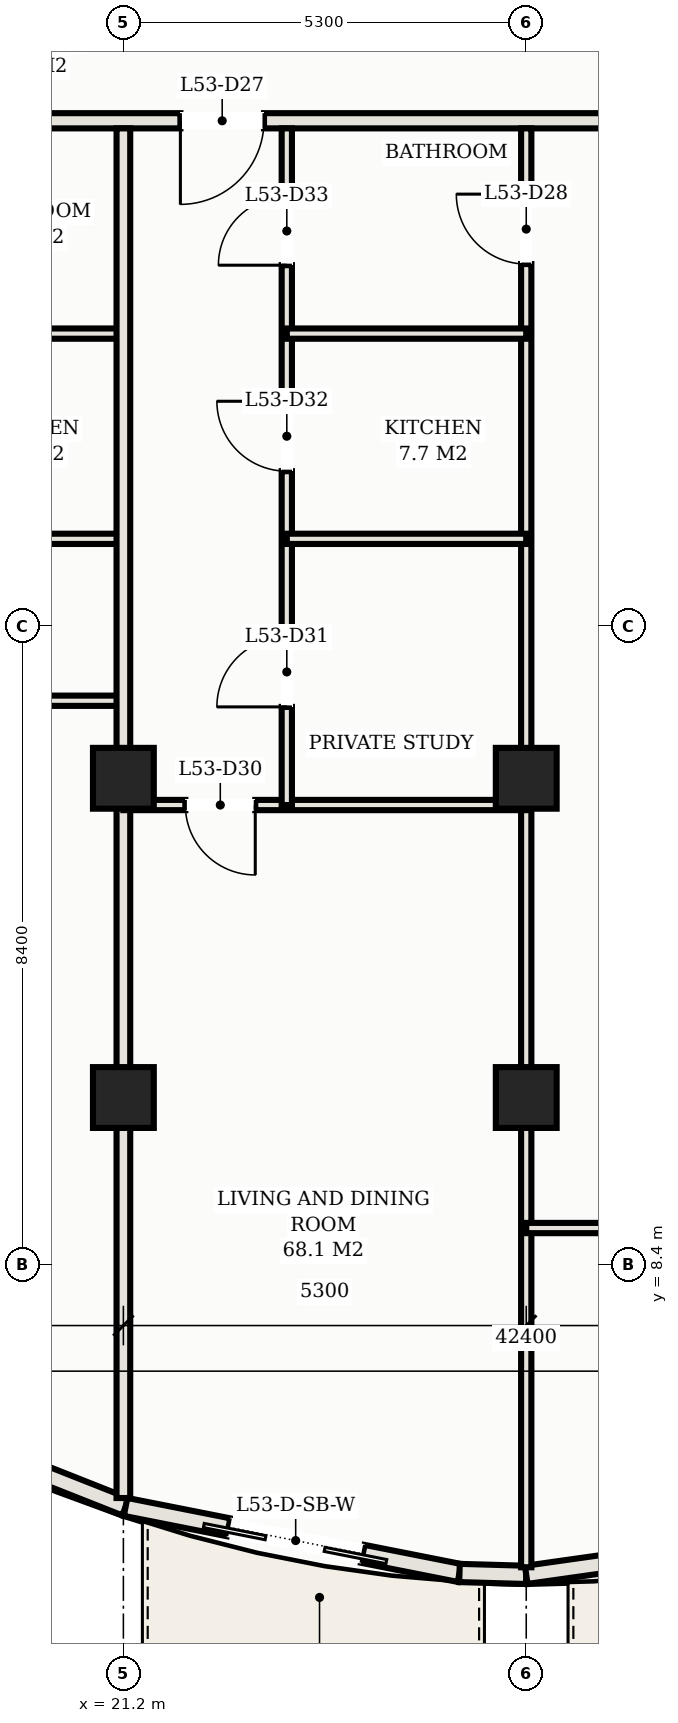
"""IFC4 building model, lengths in metres.
Left out: names, types, materials, properties, quantities, classifications, styles, units other than length and angle.
Written with IfcOpenShell. Run it as: python <this file> out.ifc"""

import sys

from ifc_helpers import new_model, si_unit, direction, frame, frame_2d, origin, origin_2d, place, context, subcontext, project, spatial, rectangle, hollow_rectangle, extrude, element, fill, save


model = new_model("IFC4")
c1 = context("Model", 3, precision=1e-05, world=origin(), true_north=direction((0.0, 1.0)))
c2 = subcontext(c1, "Body", "Model", "MODEL_VIEW")
j1 = project(units=[si_unit("LENGTHUNIT", "METRE"), si_unit("PLANEANGLEUNIT", "RADIAN")], contexts=[c1])
p1 = place(None, origin())
s1 = spatial("IfcSite", under=j1, at=p1, CompositionType="ELEMENT")
p2 = place(p1, origin())
s2 = spatial("IfcBuilding", under=s1, at=p2, CompositionType="ELEMENT")
p3 = place(p2, frame((0.0, 0.0, 196.7)))
s3 = spatial("IfcBuildingStorey", under=s2, at=p3, CompositionType="ELEMENT", Elevation=196.7)
for number, where, z_axis, x_axis in (
    (1, (21.2, 14.8, 0.0), (0.0, 0.0, 1.0), (1.0, 0.0, 0.0)),
    (2, (21.2, 10.6, 0.0), (0.0, 0.0, 1.0), (1.0, 0.0, 0.0)),
    (3, (26.5, 14.8, 0.0), (0.0, 0.0, 1.0), (1.0, 0.0, 0.0)),
    (4, (26.5, 10.6, 0.0), (0.0, 0.0, 1.0), (1.0, 0.0, 0.0)),
):
    element("IfcColumn", number, at=place(p3, frame(where, z_axis=z_axis, x_axis=x_axis)), inside=s3, PredefinedType="COLUMN", context=c2, shape_type="SweptSolid", body=[
        extrude(hollow_rectangle(XDim=0.8, YDim=0.8, WallThickness=0.028, at=origin_2d()), origin(), (0.0, 0.0, 1.0), 3.3),
    ])
p4 = place(p3, frame((19.444, 5.92, 0.0), z_axis=(0.0, 0.0, 1.0), x_axis=(0.92993442177, -0.367725401906, 0.0)))
e5 = element("IfcWall", 5, at=p4, inside=s3, PredefinedType="SOLIDWALL", context=c2, shape_type="SweptSolid", body=[
    extrude(rectangle(XDim=1.919, YDim=0.24, at=frame_2d((0.96, 0.0))), origin(), (0.0, 0.0, 1.0), 3.11),
])
p5 = place(p3, frame((21.229, 5.214, 0.0), z_axis=(0.0, 0.0, 1.0), x_axis=(0.980985349685, -0.194081796425, 0.0)))
e6 = element("IfcWall", 6, at=p5, inside=s3, PredefinedType="SOLIDWALL", context=c2, shape_type="SweptSolid", body=[
    extrude(rectangle(XDim=4.478, YDim=0.24, at=frame_2d((2.239, 0.0))), origin(), (0.0, 0.0, 1.0), 3.11),
])
p6 = place(p5, frame((1.381, 0.0, 0.0)))
e7 = element("IfcOpeningElement", 7, at=p6, cuts=e6, PredefinedType="OPENING", context=c2, shape_type="SweptSolid", body=[
    extrude(rectangle(XDim=1.8, YDim=2.2, at=frame_2d((0.9, 1.1))), frame((0.0, 0.13, 0.0), z_axis=(0.0, -1.0, 0.0), x_axis=(1.0, 0.0, 0.0)), (0.0, 0.0, 1.0), 0.26),
])
p7 = place(p3, frame((25.622, 4.345, 0.0), z_axis=(0.0, 0.0, 1.0), x_axis=(0.999597960231, -0.028353446035, 0.0)))
e8 = element("IfcWall", 8, at=p7, inside=s3, PredefinedType="SOLIDWALL", context=c2, shape_type="SweptSolid", body=[
    extrude(rectangle(XDim=0.878, YDim=0.24, at=frame_2d((0.439, 0.0))), origin(), (0.0, 0.0, 1.0), 3.11),
])
p8 = place(p3, frame((26.5, 4.32, 0.0), z_axis=(0.0, 0.0, 1.0), x_axis=(0.990156470874, 0.139964864115, 0.0)))
e9 = element("IfcWall", 9, at=p8, inside=s3, PredefinedType="SOLIDWALL", context=c2, shape_type="SweptSolid", body=[
    extrude(rectangle(XDim=4.436, YDim=0.24, at=frame_2d((2.218, 0.0))), origin(), (0.0, 0.0, 1.0), 3.11),
])
p9 = place(p8, frame((1.318, 0.0, 0.0)))
e10 = element("IfcOpeningElement", 10, at=p9, cuts=e9, PredefinedType="OPENING", context=c2, shape_type="SweptSolid", body=[
    extrude(rectangle(XDim=1.8, YDim=2.2, at=frame_2d((0.9, 1.1))), frame((0.0, 0.13, 0.0), z_axis=(0.0, -1.0, 0.0), x_axis=(1.0, 0.0, 0.0)), (0.0, 0.0, 1.0), 0.26),
])
p10 = place(p3, frame((6.72, 23.45, 0.0), z_axis=(0.0, 0.0, 1.0), x_axis=(1.0, 0.0, 0.0)))
e11 = element("IfcWall", 11, at=p10, inside=s3, PredefinedType="PARTITIONING", context=c2, shape_type="SweptSolid", body=[
    extrude(rectangle(XDim=39.56, YDim=0.2, at=frame_2d((19.78, 0.0))), origin(), (0.0, 0.0, 1.0), 2.43),
])
p11 = place(p10, frame((4.63, 0.0, 0.0)))
e12 = element("IfcOpeningElement", 12, at=p11, cuts=e11, PredefinedType="OPENING", context=c2, shape_type="SweptSolid", body=[
    extrude(rectangle(XDim=1.1, YDim=2.25, at=frame_2d((0.55, 1.125))), frame((0.0, 0.11, 0.0), z_axis=(0.0, -1.0, 0.0), x_axis=(1.0, 0.0, 0.0)), (0.0, 0.0, 1.0), 0.22),
])
p12 = place(p10, frame((9.93, 0.0, 0.0)))
e13 = element("IfcOpeningElement", 13, at=p12, cuts=e11, PredefinedType="OPENING", context=c2, shape_type="SweptSolid", body=[
    extrude(rectangle(XDim=1.1, YDim=2.25, at=frame_2d((0.55, 1.125))), frame((0.0, 0.11, 0.0), z_axis=(0.0, -1.0, 0.0), x_axis=(1.0, 0.0, 0.0)), (0.0, 0.0, 1.0), 0.22),
])
p13 = place(p10, frame((15.23, 0.0, 0.0)))
e14 = element("IfcOpeningElement", 14, at=p13, cuts=e11, PredefinedType="OPENING", context=c2, shape_type="SweptSolid", body=[
    extrude(rectangle(XDim=1.1, YDim=2.25, at=frame_2d((0.55, 1.125))), frame((0.0, 0.11, 0.0), z_axis=(0.0, -1.0, 0.0), x_axis=(1.0, 0.0, 0.0)), (0.0, 0.0, 1.0), 0.22),
])
p14 = place(p10, frame((1.635, 0.0, 0.0)))
e15 = element("IfcOpeningElement", 15, at=p14, cuts=e11, PredefinedType="OPENING", context=c2, shape_type="SweptSolid", body=[
    extrude(rectangle(XDim=0.92, YDim=2.15, at=frame_2d((0.46, 1.075))), frame((0.0, 0.11, 0.0), z_axis=(0.0, -1.0, 0.0), x_axis=(1.0, 0.0, 0.0)), (0.0, 0.0, 1.0), 0.22),
])
p15 = place(p10, frame((37.005, 0.0, 0.0)))
e16 = element("IfcOpeningElement", 16, at=p15, cuts=e11, PredefinedType="OPENING", context=c2, shape_type="SweptSolid", body=[
    extrude(rectangle(XDim=0.92, YDim=2.15, at=frame_2d((0.46, 1.075))), frame((0.0, 0.11, 0.0), z_axis=(0.0, -1.0, 0.0), x_axis=(1.0, 0.0, 0.0)), (0.0, 0.0, 1.0), 0.22),
])
p16 = place(p3, frame((15.9, 15.82, 0.0), z_axis=(0.0, 0.0, 1.0), x_axis=(1.0, 0.0, 0.0)))
e17 = element("IfcWall", 17, at=p16, inside=s3, PredefinedType="PARTITIONING", context=c2, shape_type="SweptSolid", body=[
    extrude(rectangle(XDim=5.3, YDim=0.135, at=frame_2d((2.65, 0.0))), origin(), (0.0, 0.0, 1.0), 2.43),
])
p17 = place(p16, frame((0.815, 0.0, 0.0)))
e18 = element("IfcOpeningElement", 18, at=p17, cuts=e17, PredefinedType="OPENING", context=c2, shape_type="SweptSolid", body=[
    extrude(rectangle(XDim=0.92, YDim=2.15, at=frame_2d((0.46, 1.075))), frame((0.0, 0.078, 0.0), z_axis=(0.0, -1.0, 0.0), x_axis=(1.0, 0.0, 0.0)), (0.0, 0.0, 1.0), 0.155),
])
for number, where, z_axis, x_axis in (
    (19, (18.05, 17.95, 0.0), (0.0, 0.0, 1.0), (1.0, 0.0, 0.0)),
    (20, (18.05, 20.65, 0.0), (0.0, 0.0, 1.0), (1.0, 0.0, 0.0)),
):
    element("IfcWall", number, at=place(p3, frame(where, z_axis=z_axis, x_axis=x_axis)), inside=s3, PredefinedType="PARTITIONING", context=c2, shape_type="SweptSolid", body=[
        extrude(rectangle(XDim=3.15, YDim=0.135, at=frame_2d((1.575, 0.0))), origin(), (0.0, 0.0, 1.0), 2.43),
    ])
p18 = place(p3, frame((21.2, 5.331, 0.0), z_axis=(0.0, 0.0, 1.0), x_axis=(0.0, 1.0, 0.0)))
e21 = element("IfcWall", 21, at=p18, inside=s3, PredefinedType="PARTITIONING", context=c2, shape_type="SweptSolid", body=[
    extrude(rectangle(XDim=18.019, YDim=0.18, at=frame_2d((9.01, 0.0))), origin(), (0.0, 0.0, 1.0), 2.43),
])
p19 = place(p3, frame((26.5, 4.42, 0.0), z_axis=(0.0, 0.0, 1.0), x_axis=(0.0, 1.0, 0.0)))
e22 = element("IfcWall", 22, at=p19, inside=s3, PredefinedType="PARTITIONING", context=c2, shape_type="SweptSolid", body=[
    extrude(rectangle(XDim=18.93, YDim=0.135, at=frame_2d((9.465, 0.0))), origin(), (0.0, 0.0, 1.0), 2.43),
])
p20 = place(p19, frame((17.145, 0.0, 0.0)))
e23 = element("IfcOpeningElement", 23, at=p20, cuts=e22, PredefinedType="OPENING", context=c2, shape_type="SweptSolid", body=[
    extrude(rectangle(XDim=0.92, YDim=2.15, at=frame_2d((0.46, 1.075))), frame((0.0, 0.078, 0.0), z_axis=(0.0, -1.0, 0.0), x_axis=(1.0, 0.0, 0.0)), (0.0, 0.0, 1.0), 0.155),
])
p21 = place(p3, frame((21.2, 14.448, 0.0), z_axis=(0.0, 0.0, 1.0), x_axis=(1.0, 0.0, 0.0)))
e24 = element("IfcWall", 24, at=p21, inside=s3, PredefinedType="PARTITIONING", context=c2, shape_type="SweptSolid", body=[
    extrude(rectangle(XDim=5.3, YDim=0.135, at=frame_2d((2.65, 0.0))), origin(), (0.0, 0.0, 1.0), 2.43),
])
p22 = place(p21, frame((0.815, 0.0, 0.0)))
e25 = element("IfcOpeningElement", 25, at=p22, cuts=e24, PredefinedType="OPENING", context=c2, shape_type="SweptSolid", body=[
    extrude(rectangle(XDim=0.92, YDim=2.15, at=frame_2d((0.46, 1.075))), frame((0.0, 0.078, 0.0), z_axis=(0.0, -1.0, 0.0), x_axis=(1.0, 0.0, 0.0)), (0.0, 0.0, 1.0), 0.155),
])
p23 = place(p3, frame((23.35, 14.448, 0.0), z_axis=(0.0, 0.0, 1.0), x_axis=(0.0, 1.0, 0.0)))
e26 = element("IfcWall", 26, at=p23, inside=s3, PredefinedType="PARTITIONING", context=c2, shape_type="SweptSolid", body=[
    extrude(rectangle(XDim=8.902, YDim=0.135, at=frame_2d((4.451, 0.0))), origin(), (0.0, 0.0, 1.0), 2.43),
])
p24 = place(p23, frame((1.291, 0.0, 0.0)))
e27 = element("IfcOpeningElement", 27, at=p24, cuts=e26, PredefinedType="OPENING", context=c2, shape_type="SweptSolid", body=[
    extrude(rectangle(XDim=0.92, YDim=2.15, at=frame_2d((0.46, 1.075))), frame((0.0, 0.078, 0.0), z_axis=(0.0, -1.0, 0.0), x_axis=(1.0, 0.0, 0.0)), (0.0, 0.0, 1.0), 0.155),
])
p25 = place(p23, frame((4.392, 0.0, 0.0)))
e28 = element("IfcOpeningElement", 28, at=p25, cuts=e26, PredefinedType="OPENING", context=c2, shape_type="SweptSolid", body=[
    extrude(rectangle(XDim=0.92, YDim=2.15, at=frame_2d((0.46, 1.075))), frame((0.0, 0.078, 0.0), z_axis=(0.0, -1.0, 0.0), x_axis=(1.0, 0.0, 0.0)), (0.0, 0.0, 1.0), 0.155),
])
p26 = place(p23, frame((7.102, 0.0, 0.0)))
e29 = element("IfcOpeningElement", 29, at=p26, cuts=e26, PredefinedType="OPENING", context=c2, shape_type="SweptSolid", body=[
    extrude(rectangle(XDim=0.9, YDim=2.15, at=frame_2d((0.45, 1.075))), frame((0.0, 0.078, 0.0), z_axis=(0.0, -1.0, 0.0), x_axis=(1.0, 0.0, 0.0)), (0.0, 0.0, 1.0), 0.155),
])
for number, where, z_axis, x_axis in (
    (30, (23.35, 17.95, 0.0), (0.0, 0.0, 1.0), (1.0, 0.0, 0.0)),
    (31, (23.35, 20.65, 0.0), (0.0, 0.0, 1.0), (1.0, 0.0, 0.0)),
):
    element("IfcWall", number, at=place(p3, frame(where, z_axis=z_axis, x_axis=x_axis)), inside=s3, PredefinedType="PARTITIONING", context=c2, shape_type="SweptSolid", body=[
        extrude(rectangle(XDim=3.15, YDim=0.135, at=frame_2d((1.575, 0.0))), origin(), (0.0, 0.0, 1.0), 2.43),
    ])
p27 = place(p3, frame((26.5, 8.883, 0.0), z_axis=(0.0, 0.0, 1.0), x_axis=(1.0, 0.0, 0.0)))
e32 = element("IfcWall", 32, at=p27, inside=s3, PredefinedType="PARTITIONING", context=c2, shape_type="SweptSolid", body=[
    extrude(rectangle(XDim=8.9, YDim=0.135, at=frame_2d((4.45, 0.0))), origin(), (0.0, 0.0, 1.0), 2.43),
])
p28 = place(p27, frame((2.175, 0.0, 0.0)))
e33 = element("IfcOpeningElement", 33, at=p28, cuts=e32, PredefinedType="OPENING", context=c2, shape_type="SweptSolid", body=[
    extrude(rectangle(XDim=0.95, YDim=2.15, at=frame_2d((0.475, 1.075))), frame((0.0, 0.078, 0.0), z_axis=(0.0, -1.0, 0.0), x_axis=(1.0, 0.0, 0.0)), (0.0, 0.0, 1.0), 0.155),
])
p29 = place(p27, frame((6.65, 0.0, 0.0)))
e34 = element("IfcOpeningElement", 34, at=p29, cuts=e32, PredefinedType="OPENING", context=c2, shape_type="SweptSolid", body=[
    extrude(rectangle(XDim=0.9, YDim=2.15, at=frame_2d((0.45, 1.075))), frame((0.0, 0.078, 0.0), z_axis=(0.0, -1.0, 0.0), x_axis=(1.0, 0.0, 0.0)), (0.0, 0.0, 1.0), 0.155),
])
p30 = place(p6, frame((1.8, 0.0, 0.0), z_axis=(0.0, 0.0, 1.0), x_axis=(-1.0, 0.0, 0.0)))
e35 = element("IfcDoor", 35, at=p30, inside=s3, OperationType="DOUBLE_DOOR_SLIDING", PredefinedType="DOOR", context=c2, shape_type="SweptSolid", body=[
    extrude(rectangle(XDim=1.8, YDim=2.2, at=frame_2d((0.9, 1.1))), frame((0.0, 0.025, 0.0), z_axis=(0.0, -1.0, 0.0), x_axis=(1.0, 0.0, 0.0)), (0.0, 0.0, 1.0), 0.05),
])
fill(e7, e35)
p31 = place(p13, frame((1.1, 0.0, 0.0), z_axis=(0.0, 0.0, 1.0), x_axis=(-1.0, 0.0, 0.0)))
e36 = element("IfcDoor", 36, at=p31, inside=s3, OperationType="SINGLE_SWING_RIGHT", PredefinedType="DOOR", context=c2, shape_type="SweptSolid", body=[
    extrude(rectangle(XDim=1.1, YDim=2.25, at=frame_2d((0.55, 1.125))), frame((0.0, 0.025, 0.0), z_axis=(0.0, -1.0, 0.0), x_axis=(1.0, 0.0, 0.0)), (0.0, 0.0, 1.0), 0.05),
])
fill(e14, e36)
p32 = place(p20, origin())
e37 = element("IfcDoor", 37, at=p32, inside=s3, OperationType="SINGLE_SWING_RIGHT", PredefinedType="DOOR", context=c2, shape_type="SweptSolid", body=[
    extrude(rectangle(XDim=0.92, YDim=2.15, at=frame_2d((0.46, 1.075))), frame((0.0, 0.025, 0.0), z_axis=(0.0, -1.0, 0.0), x_axis=(1.0, 0.0, 0.0)), (0.0, 0.0, 1.0), 0.05),
])
fill(e23, e37)
p33 = place(p22, frame((0.92, 0.0, 0.0), z_axis=(0.0, 0.0, 1.0), x_axis=(-1.0, 0.0, 0.0)))
e38 = element("IfcDoor", 38, at=p33, inside=s3, OperationType="SINGLE_SWING_LEFT", PredefinedType="DOOR", context=c2, shape_type="SweptSolid", body=[
    extrude(rectangle(XDim=0.92, YDim=2.15, at=frame_2d((0.46, 1.075))), frame((0.0, 0.025, 0.0), z_axis=(0.0, -1.0, 0.0), x_axis=(1.0, 0.0, 0.0)), (0.0, 0.0, 1.0), 0.05),
])
fill(e25, e38)
p34 = place(p24, origin())
e39 = element("IfcDoor", 39, at=p34, inside=s3, OperationType="SINGLE_SWING_LEFT", PredefinedType="DOOR", context=c2, shape_type="SweptSolid", body=[
    extrude(rectangle(XDim=0.92, YDim=2.15, at=frame_2d((0.46, 1.075))), frame((0.0, 0.025, 0.0), z_axis=(0.0, -1.0, 0.0), x_axis=(1.0, 0.0, 0.0)), (0.0, 0.0, 1.0), 0.05),
])
fill(e27, e39)
p35 = place(p25, origin())
e40 = element("IfcDoor", 40, at=p35, inside=s3, OperationType="SINGLE_SWING_RIGHT", PredefinedType="DOOR", context=c2, shape_type="SweptSolid", body=[
    extrude(rectangle(XDim=0.92, YDim=2.15, at=frame_2d((0.46, 1.075))), frame((0.0, 0.025, 0.0), z_axis=(0.0, -1.0, 0.0), x_axis=(1.0, 0.0, 0.0)), (0.0, 0.0, 1.0), 0.05),
])
fill(e28, e40)
p36 = place(p26, origin())
e41 = element("IfcDoor", 41, at=p36, inside=s3, OperationType="SINGLE_SWING_LEFT", PredefinedType="DOOR", context=c2, shape_type="SweptSolid", body=[
    extrude(rectangle(XDim=0.9, YDim=2.15, at=frame_2d((0.45, 1.075))), frame((0.0, 0.025, 0.0), z_axis=(0.0, -1.0, 0.0), x_axis=(1.0, 0.0, 0.0)), (0.0, 0.0, 1.0), 0.05),
])
fill(e29, e41)
save(model, sys.argv[1])
